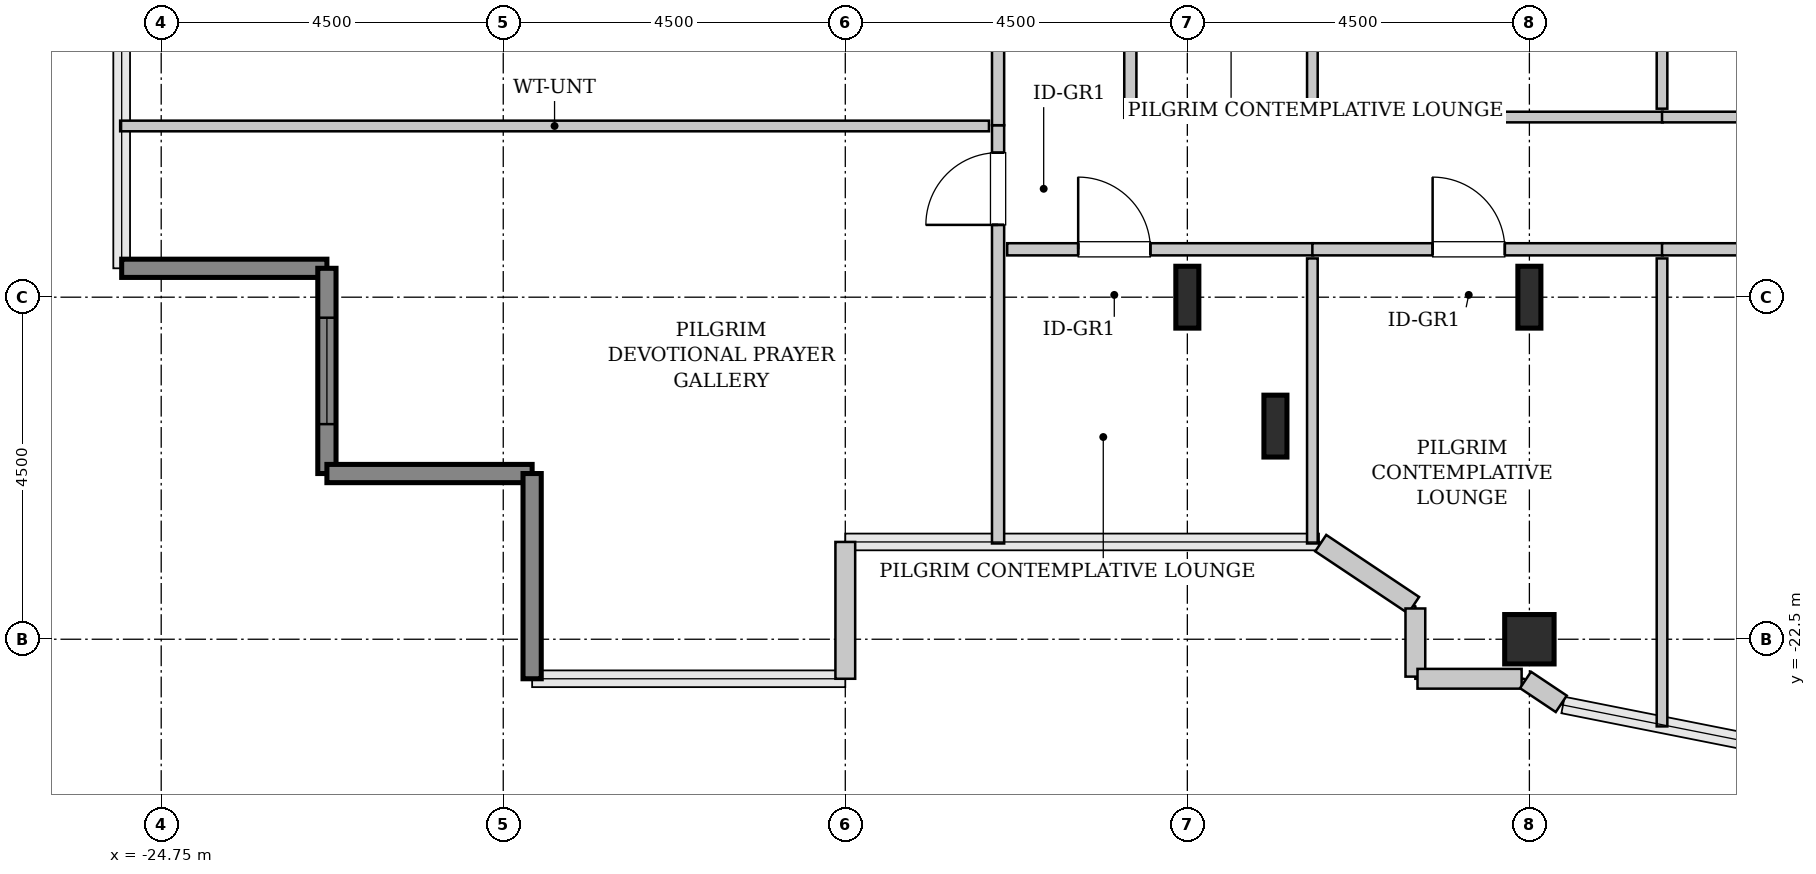
"""IFC4 building model, lengths in metres.
Left out: names, types, materials, properties, quantities, classifications, styles, units other than length and angle.
Written with IfcOpenShell. Run it as: python <this file> out.ifc"""

import sys

from ifc_helpers import new_model, si_unit, direction, frame, frame_2d, origin, origin_2d, place, context, subcontext, project, spatial, rectangle, hollow_rectangle, i_section, extrude, source, transform, mapped, element, fill, save


model = new_model("IFC4")
c1 = context("Model", 3, precision=1e-05, world=origin(), true_north=direction((0.0, 1.0)))
c2 = subcontext(c1, "Body", "Model", "MODEL_VIEW")
j1 = project(units=[si_unit("LENGTHUNIT", "METRE"), si_unit("PLANEANGLEUNIT", "RADIAN")], contexts=[c1])
p1 = place(None, origin())
s1 = spatial("IfcSite", under=j1, at=p1, CompositionType="ELEMENT")
p2 = place(p1, origin())
s2 = spatial("IfcBuilding", under=s1, at=p2, CompositionType="ELEMENT")
p3 = place(p2, frame((0.0, 0.0, 229.4)))
s3 = spatial("IfcBuildingStorey", under=s2, at=p3, CompositionType="ELEMENT", Elevation=229.4)
m1 = source(origin(), c2, "Body", "SweptSolid", [
    extrude(i_section(OverallWidth=0.303, OverallDepth=0.814, WebThickness=0.021, FlangeThickness=0.04, FilletRadius=0.03, at=origin_2d()), origin(), (0.0, 0.0, 1.0), 3.8),
])
for number, where, z_axis, x_axis in (
    (1, (-11.25, -18.0, 0.0), (0.0, 0.0, 1.0), (1.0, 0.0, 0.0)),
    (2, (-10.091, -19.696, 0.0), (0.0, 0.0, 1.0), (1.0, 0.0, 0.0)),
):
    element("IfcColumn", number, at=place(p3, frame(where, z_axis=z_axis, x_axis=x_axis)), inside=s3, PredefinedType="COLUMN", context=c2, shape_type="MappedRepresentation", body=[
        mapped(m1, transform((0.0, 0.0, 0.0), x_axis=(1.0, 0.0, 0.0), y_axis=(0.0, 1.0, 0.0), z_axis=(0.0, 0.0, 1.0), scale=1.0)),
    ])
m2 = source(origin(), c2, "Body", "SweptSolid", [
    extrude(hollow_rectangle(XDim=0.65, YDim=0.65, WallThickness=0.032, InnerFilletRadius=0.032, OuterFilletRadius=0.064, at=origin_2d()), origin(), (0.0, 0.0, 1.0), 3.8),
])
p4 = place(p3, frame((-6.75, -22.5, 0.0), z_axis=(0.0, 0.0, 1.0), x_axis=(1.0, 0.0, 0.0)))
e3 = element("IfcColumn", 3, at=p4, inside=s3, PredefinedType="COLUMN", context=c2, shape_type="MappedRepresentation", body=[
    mapped(m2, transform((0.0, 0.0, 0.0), x_axis=(1.0, 0.0, 0.0), y_axis=(0.0, 1.0, 0.0), z_axis=(0.0, 0.0, 1.0), scale=1.0)),
])
p5 = place(p3, frame((-6.75, -18.0, 0.0), z_axis=(0.0, 0.0, 1.0), x_axis=(1.0, 0.0, 0.0)))
e4 = element("IfcColumn", 4, at=p5, inside=s3, PredefinedType="COLUMN", context=c2, shape_type="MappedRepresentation", body=[
    mapped(m1, transform((0.0, 0.0, 0.0), x_axis=(1.0, 0.0, 0.0), y_axis=(0.0, 1.0, 0.0), z_axis=(0.0, 0.0, 1.0), scale=1.0)),
])
m3 = source(origin(), c2, "Body", "SweptSolid", [
    extrude(rectangle(XDim=2.7, YDim=0.24, at=frame_2d((1.35, 0.0))), origin(), (0.0, 0.0, 1.0), 3.55),
])
p6 = place(p3, frame((-25.27, -17.62, 0.0), z_axis=(0.0, 0.0, 1.0), x_axis=(1.0, 0.0, 0.0)))
e5 = element("IfcWall", 5, at=p6, inside=s3, PredefinedType="SHEAR", context=c2, shape_type="MappedRepresentation", body=[
    mapped(m3, transform((0.0, 0.0, 0.0), x_axis=(1.0, 0.0, 0.0), y_axis=(0.0, 1.0, 0.0), z_axis=(0.0, 0.0, 1.0), scale=1.0)),
])
p7 = place(p3, frame((-22.57, -17.62, 0.0), z_axis=(0.0, 0.0, 1.0), x_axis=(0.0, -1.0, 0.0)))
e6 = element("IfcWall", 6, at=p7, inside=s3, PredefinedType="SHEAR", context=c2, shape_type="MappedRepresentation", body=[
    mapped(m3, transform((0.0, 0.0, 0.0), x_axis=(1.0, 0.0, 0.0), y_axis=(0.0, 1.0, 0.0), z_axis=(0.0, 0.0, 1.0), scale=1.0)),
])
p8 = place(p7, frame((0.65, 0.0, 0.85)))
e7 = element("IfcOpeningElement", 7, at=p8, cuts=e6, PredefinedType="OPENING", context=c2, shape_type="SweptSolid", body=[
    extrude(rectangle(XDim=1.4, YDim=1.8, at=frame_2d((0.7, 0.9))), frame((0.0, 0.13, 0.0), z_axis=(0.0, -1.0, 0.0), x_axis=(1.0, 0.0, 0.0)), (0.0, 0.0, 1.0), 0.26),
])
for number, where, z_axis, x_axis in (
    (8, (-22.57, -20.32, 0.0), (0.0, 0.0, 1.0), (1.0, 0.0, 0.0)),
    (9, (-19.87, -20.32, 0.0), (0.0, 0.0, 1.0), (0.0, -1.0, 0.0)),
):
    element("IfcWall", number, at=place(p3, frame(where, z_axis=z_axis, x_axis=x_axis)), inside=s3, PredefinedType="SHEAR", context=c2, shape_type="MappedRepresentation", body=[
        mapped(m3, transform((0.0, 0.0, 0.0), x_axis=(1.0, 0.0, 0.0), y_axis=(0.0, 1.0, 0.0), z_axis=(0.0, 0.0, 1.0), scale=1.0)),
    ])
m4 = source(origin(), c2, "Body", "SweptSolid", [
    extrude(rectangle(XDim=1.8, YDim=0.26, at=frame_2d((0.9, 0.0))), origin(), (0.0, 0.0, 1.0), 3.55),
])
p9 = place(p3, frame((-15.75, -23.02, 0.0), z_axis=(0.0, 0.0, 1.0), x_axis=(0.0, 1.0, 0.0)))
e10 = element("IfcWall", 10, at=p9, inside=s3, PredefinedType="SOLIDWALL", context=c2, shape_type="MappedRepresentation", body=[
    mapped(m4, transform((0.0, 0.0, 0.0), x_axis=(1.0, 0.0, 0.0), y_axis=(0.0, 1.0, 0.0), z_axis=(0.0, 0.0, 1.0), scale=1.0)),
])
m5 = source(origin(), c2, "Body", "SweptSolid", [
    extrude(rectangle(XDim=1.469, YDim=0.26, at=frame_2d((0.734, 0.0))), origin(), (0.0, 0.0, 1.0), 3.55),
])
p10 = place(p3, frame((-9.495, -21.236, 0.0), z_axis=(0.0, 0.0, 1.0), x_axis=(0.831461760506, -0.555581983884, 0.0)))
e11 = element("IfcWall", 11, at=p10, inside=s3, PredefinedType="SOLIDWALL", context=c2, shape_type="MappedRepresentation", body=[
    mapped(m5, transform((0.0, 0.0, 0.0), x_axis=(1.0, 0.0, 0.0), y_axis=(0.0, 1.0, 0.0), z_axis=(0.0, 0.0, 1.0), scale=1.0)),
])
m6 = source(origin(), c2, "Body", "SweptSolid", [
    extrude(rectangle(XDim=0.897, YDim=0.26, at=frame_2d((0.448, 0.0))), origin(), (0.0, 0.0, 1.0), 3.55),
])
p11 = place(p3, frame((-8.25, -22.095, 0.0), z_axis=(0.0, 0.0, 1.0), x_axis=(0.0, -1.0, 0.0)))
e12 = element("IfcWall", 12, at=p11, inside=s3, PredefinedType="SOLIDWALL", context=c2, shape_type="MappedRepresentation", body=[
    mapped(m6, transform((0.0, 0.0, 0.0), x_axis=(1.0, 0.0, 0.0), y_axis=(0.0, 1.0, 0.0), z_axis=(0.0, 0.0, 1.0), scale=1.0)),
])
m7 = source(origin(), c2, "Body", "SweptSolid", [
    extrude(rectangle(XDim=1.37, YDim=0.26, at=frame_2d((0.685, 0.0))), origin(), (0.0, 0.0, 1.0), 3.55),
])
p12 = place(p3, frame((-8.222, -23.02, 0.0), z_axis=(0.0, 0.0, 1.0), x_axis=(1.0, 0.0, 0.0)))
e13 = element("IfcWall", 13, at=p12, inside=s3, PredefinedType="SOLIDWALL", context=c2, shape_type="MappedRepresentation", body=[
    mapped(m7, transform((0.0, 0.0, 0.0), x_axis=(1.0, 0.0, 0.0), y_axis=(0.0, 1.0, 0.0), z_axis=(0.0, 0.0, 1.0), scale=1.0)),
])
m8 = source(origin(), c2, "Body", "SweptSolid", [
    extrude(rectangle(XDim=0.565, YDim=0.26, at=frame_2d((0.283, 0.0))), origin(), (0.0, 0.0, 1.0), 3.55),
])
p13 = place(p3, frame((-6.801, -23.036, 0.0), z_axis=(0.0, 0.0, 1.0), x_axis=(0.831651492666, -0.555297933317, 0.0)))
e14 = element("IfcWall", 14, at=p13, inside=s3, PredefinedType="SOLIDWALL", context=c2, shape_type="MappedRepresentation", body=[
    mapped(m8, transform((0.0, 0.0, 0.0), x_axis=(1.0, 0.0, 0.0), y_axis=(0.0, 1.0, 0.0), z_axis=(0.0, 0.0, 1.0), scale=1.0)),
])
m9 = source(origin(), c2, "Body", "SweptSolid", [
    extrude(rectangle(XDim=5.502, YDim=0.16, at=frame_2d((2.751, 0.0))), origin(), (0.0, 0.0, 1.0), 3.535),
])
p14 = place(p3, frame((-13.74, -21.24, 0.0), z_axis=(0.0, 0.0, 1.0), x_axis=(0.0, 1.0, 0.0)))
e15 = element("IfcWall", 15, at=p14, inside=s3, PredefinedType="PARTITIONING", context=c2, shape_type="MappedRepresentation", body=[
    mapped(m9, transform((0.0, 0.0, 0.0), x_axis=(1.0, 0.0, 0.0), y_axis=(0.0, 1.0, 0.0), z_axis=(0.0, 0.0, 1.0), scale=1.0)),
])
p15 = place(p14, frame((4.191, 0.0, 0.0)))
e16 = element("IfcOpeningElement", 16, at=p15, cuts=e15, PredefinedType="OPENING", context=c2, shape_type="SweptSolid", body=[
    extrude(rectangle(XDim=0.95, YDim=2.1, at=frame_2d((0.475, 1.05))), frame((0.0, 0.09, 0.0), z_axis=(0.0, -1.0, 0.0), x_axis=(1.0, 0.0, 0.0)), (0.0, 0.0, 1.0), 0.18),
])
m10 = source(origin(), c2, "Body", "SweptSolid", [
    extrude(rectangle(XDim=11.43, YDim=0.14, at=frame_2d((5.715, 0.0))), origin(), (0.0, 0.0, 1.0), 3.535),
])
p16 = place(p3, frame((-25.29, -15.748, 0.0), z_axis=(0.0, 0.0, 1.0), x_axis=(1.0, 0.0, 0.0)))
e17 = element("IfcWall", 17, at=p16, inside=s3, PredefinedType="PARTITIONING", context=c2, shape_type="MappedRepresentation", body=[
    mapped(m10, transform((0.0, 0.0, 0.0), x_axis=(1.0, 0.0, 0.0), y_axis=(0.0, 1.0, 0.0), z_axis=(0.0, 0.0, 1.0), scale=1.0)),
])
m11 = source(origin(), c2, "Body", "SweptSolid", [
    extrude(rectangle(XDim=7.242, YDim=0.16, at=frame_2d((3.621, 0.0))), origin(), (0.0, 0.0, 1.0), 3.535),
])
p17 = place(p3, frame((-13.74, -15.738, 0.0), z_axis=(0.0, 0.0, 1.0), x_axis=(0.0, 1.0, 0.0)))
e18 = element("IfcWall", 18, at=p17, inside=s3, PredefinedType="PARTITIONING", context=c2, shape_type="MappedRepresentation", body=[
    mapped(m11, transform((0.0, 0.0, 0.0), x_axis=(1.0, 0.0, 0.0), y_axis=(0.0, 1.0, 0.0), z_axis=(0.0, 0.0, 1.0), scale=1.0)),
])
p18 = place(p17, frame((3.146, 0.0, 0.0)))
e19 = element("IfcOpeningElement", 19, at=p18, cuts=e18, PredefinedType="OPENING", context=c2, shape_type="SweptSolid", body=[
    extrude(rectangle(XDim=0.95, YDim=2.1, at=frame_2d((0.475, 1.05))), frame((0.0, 0.09, 0.0), z_axis=(0.0, -1.0, 0.0), x_axis=(1.0, 0.0, 0.0)), (0.0, 0.0, 1.0), 0.18),
])
m12 = source(origin(), c2, "Body", "SweptSolid", [
    extrude(rectangle(XDim=4.025, YDim=0.16, at=frame_2d((2.013, 0.0))), origin(), (0.0, 0.0, 1.0), 3.535),
])
p19 = place(p3, frame((-13.62, -17.37, 0.0), z_axis=(0.0, 0.0, 1.0), x_axis=(1.0, 0.0, 0.0)))
e20 = element("IfcWall", 20, at=p19, inside=s3, PredefinedType="PARTITIONING", context=c2, shape_type="MappedRepresentation", body=[
    mapped(m12, transform((0.0, 0.0, 0.0), x_axis=(1.0, 0.0, 0.0), y_axis=(0.0, 1.0, 0.0), z_axis=(0.0, 0.0, 1.0), scale=1.0)),
])
p20 = place(p19, frame((0.934, 0.0, 0.0)))
e21 = element("IfcOpeningElement", 21, at=p20, cuts=e20, PredefinedType="OPENING", context=c2, shape_type="SweptSolid", body=[
    extrude(rectangle(XDim=0.95, YDim=2.1, at=frame_2d((0.475, 1.05))), frame((0.0, 0.09, 0.0), z_axis=(0.0, -1.0, 0.0), x_axis=(1.0, 0.0, 0.0)), (0.0, 0.0, 1.0), 0.18),
])
m13 = source(origin(), c2, "Body", "SweptSolid", [
    extrude(rectangle(XDim=3.75, YDim=0.14, at=frame_2d((1.875, 0.0))), origin(), (0.0, 0.0, 1.0), 3.535),
])
p21 = place(p3, frame((-9.605, -21.24, 0.0), z_axis=(0.0, 0.0, 1.0), x_axis=(0.0, 1.0, 0.0)))
e22 = element("IfcWall", 22, at=p21, inside=s3, PredefinedType="PARTITIONING", context=c2, shape_type="MappedRepresentation", body=[
    mapped(m13, transform((0.0, 0.0, 0.0), x_axis=(1.0, 0.0, 0.0), y_axis=(0.0, 1.0, 0.0), z_axis=(0.0, 0.0, 1.0), scale=1.0)),
])
m14 = source(origin(), c2, "Body", "SweptSolid", [
    extrude(rectangle(XDim=4.18, YDim=0.16, at=frame_2d((2.09, 0.0))), origin(), (0.0, 0.0, 1.0), 3.535),
])
p22 = place(p3, frame((-12.0, -15.64, 0.0), z_axis=(0.0, 0.0, 1.0), x_axis=(0.0, 1.0, 0.0)))
e23 = element("IfcWall", 23, at=p22, inside=s3, PredefinedType="PARTITIONING", context=c2, shape_type="MappedRepresentation", body=[
    mapped(m14, transform((0.0, 0.0, 0.0), x_axis=(1.0, 0.0, 0.0), y_axis=(0.0, 1.0, 0.0), z_axis=(0.0, 0.0, 1.0), scale=1.0)),
])
p23 = place(p22, frame((1.615, 0.0, 0.0)))
e24 = element("IfcOpeningElement", 24, at=p23, cuts=e23, PredefinedType="OPENING", context=c2, shape_type="SweptSolid", body=[
    extrude(rectangle(XDim=0.95, YDim=2.1, at=frame_2d((0.475, 1.05))), frame((0.0, 0.09, 0.0), z_axis=(0.0, -1.0, 0.0), x_axis=(1.0, 0.0, 0.0)), (0.0, 0.0, 1.0), 0.18),
])
m15 = source(origin(), c2, "Body", "SweptSolid", [
    extrude(rectangle(XDim=4.18, YDim=0.14, at=frame_2d((2.09, 0.0))), origin(), (0.0, 0.0, 1.0), 3.535),
])
p24 = place(p3, frame((-9.605, -15.64, 0.0), z_axis=(0.0, 0.0, 1.0), x_axis=(0.0, 1.0, 0.0)))
e25 = element("IfcWall", 25, at=p24, inside=s3, PredefinedType="PARTITIONING", context=c2, shape_type="MappedRepresentation", body=[
    mapped(m15, transform((0.0, 0.0, 0.0), x_axis=(1.0, 0.0, 0.0), y_axis=(0.0, 1.0, 0.0), z_axis=(0.0, 0.0, 1.0), scale=1.0)),
])
m16 = source(origin(), c2, "Body", "SweptSolid", [
    extrude(rectangle(XDim=2.165, YDim=0.14, at=frame_2d((1.083, 0.0))), origin(), (0.0, 0.0, 1.0), 3.535),
])
p25 = place(p3, frame((-11.88, -15.63, 0.0), z_axis=(0.0, 0.0, 1.0), x_axis=(1.0, 0.0, 0.0)))
e26 = element("IfcWall", 26, at=p25, inside=s3, PredefinedType="PARTITIONING", context=c2, shape_type="MappedRepresentation", body=[
    mapped(m16, transform((0.0, 0.0, 0.0), x_axis=(1.0, 0.0, 0.0), y_axis=(0.0, 1.0, 0.0), z_axis=(0.0, 0.0, 1.0), scale=1.0)),
])
m17 = source(origin(), c2, "Body", "SweptSolid", [
    extrude(rectangle(XDim=4.61, YDim=0.16, at=frame_2d((2.305, 0.0))), origin(), (0.0, 0.0, 1.0), 3.535),
])
p26 = place(p3, frame((-9.605, -17.37, 0.0), z_axis=(0.0, 0.0, 1.0), x_axis=(1.0, 0.0, 0.0)))
e27 = element("IfcWall", 27, at=p26, inside=s3, PredefinedType="PARTITIONING", context=c2, shape_type="MappedRepresentation", body=[
    mapped(m17, transform((0.0, 0.0, 0.0), x_axis=(1.0, 0.0, 0.0), y_axis=(0.0, 1.0, 0.0), z_axis=(0.0, 0.0, 1.0), scale=1.0)),
])
p27 = place(p26, frame((1.582, 0.0, 0.0)))
e28 = element("IfcOpeningElement", 28, at=p27, cuts=e27, PredefinedType="OPENING", context=c2, shape_type="SweptSolid", body=[
    extrude(rectangle(XDim=0.95, YDim=2.1, at=frame_2d((0.475, 1.05))), frame((0.0, 0.09, 0.0), z_axis=(0.0, -1.0, 0.0), x_axis=(1.0, 0.0, 0.0)), (0.0, 0.0, 1.0), 0.18),
])
m18 = source(origin(), c2, "Body", "SweptSolid", [
    extrude(rectangle(XDim=6.157, YDim=0.14, at=frame_2d((3.078, 0.0))), origin(), (0.0, 0.0, 1.0), 3.535),
])
p28 = place(p3, frame((-5.005, -23.647, 0.0), z_axis=(0.0, 0.0, 1.0), x_axis=(0.0, 1.0, 0.0)))
e29 = element("IfcWall", 29, at=p28, inside=s3, PredefinedType="PARTITIONING", context=c2, shape_type="MappedRepresentation", body=[
    mapped(m18, transform((0.0, 0.0, 0.0), x_axis=(1.0, 0.0, 0.0), y_axis=(0.0, 1.0, 0.0), z_axis=(0.0, 0.0, 1.0), scale=1.0)),
])
m19 = source(origin(), c2, "Body", "SweptSolid", [
    extrude(rectangle(XDim=4.5, YDim=0.14, at=frame_2d((2.25, 0.0))), origin(), (0.0, 0.0, 1.0), 3.535),
])
p29 = place(p3, frame((-9.495, -15.63, 0.0), z_axis=(0.0, 0.0, 1.0), x_axis=(1.0, 0.0, 0.0)))
e30 = element("IfcWall", 30, at=p29, inside=s3, PredefinedType="PARTITIONING", context=c2, shape_type="MappedRepresentation", body=[
    mapped(m19, transform((0.0, 0.0, 0.0), x_axis=(1.0, 0.0, 0.0), y_axis=(0.0, 1.0, 0.0), z_axis=(0.0, 0.0, 1.0), scale=1.0)),
])
m20 = source(origin(), c2, "Body", "SweptSolid", [
    extrude(rectangle(XDim=3.93, YDim=0.14, at=frame_2d((1.965, 0.0))), origin(), (0.0, 0.0, 1.0), 3.535),
])
p30 = place(p3, frame((-5.005, -15.52, 0.0), z_axis=(0.0, 0.0, 1.0), x_axis=(0.0, 1.0, 0.0)))
e31 = element("IfcWall", 31, at=p30, inside=s3, PredefinedType="PARTITIONING", context=c2, shape_type="MappedRepresentation", body=[
    mapped(m20, transform((0.0, 0.0, 0.0), x_axis=(1.0, 0.0, 0.0), y_axis=(0.0, 1.0, 0.0), z_axis=(0.0, 0.0, 1.0), scale=1.0)),
])
m21 = source(origin(), c2, "Body", "SweptSolid", [
    extrude(rectangle(XDim=7.21, YDim=0.16, at=frame_2d((3.605, 0.0))), origin(), (0.0, 0.0, 1.0), 3.535),
])
p31 = place(p3, frame((-5.005, -17.37, 0.0), z_axis=(0.0, 0.0, 1.0), x_axis=(1.0, 0.0, 0.0)))
e32 = element("IfcWall", 32, at=p31, inside=s3, PredefinedType="PARTITIONING", context=c2, shape_type="MappedRepresentation", body=[
    mapped(m21, transform((0.0, 0.0, 0.0), x_axis=(1.0, 0.0, 0.0), y_axis=(0.0, 1.0, 0.0), z_axis=(0.0, 0.0, 1.0), scale=1.0)),
])
p32 = place(p31, frame((3.13, 0.0, 0.0)))
e33 = element("IfcOpeningElement", 33, at=p32, cuts=e32, PredefinedType="OPENING", context=c2, shape_type="SweptSolid", body=[
    extrude(rectangle(XDim=0.95, YDim=2.1, at=frame_2d((0.475, 1.05))), frame((0.0, 0.09, 0.0), z_axis=(0.0, -1.0, 0.0), x_axis=(1.0, 0.0, 0.0)), (0.0, 0.0, 1.0), 0.18),
])
m22 = source(origin(), c2, "Body", "SweptSolid", [
    extrude(rectangle(XDim=7.21, YDim=0.14, at=frame_2d((3.605, 0.0))), origin(), (0.0, 0.0, 1.0), 3.535),
])
p33 = place(p3, frame((-5.005, -15.63, 0.0), z_axis=(0.0, 0.0, 1.0), x_axis=(1.0, 0.0, 0.0)))
e34 = element("IfcWall", 34, at=p33, inside=s3, PredefinedType="PARTITIONING", context=c2, shape_type="MappedRepresentation", body=[
    mapped(m22, transform((0.0, 0.0, 0.0), x_axis=(1.0, 0.0, 0.0), y_axis=(0.0, 1.0, 0.0), z_axis=(0.0, 0.0, 1.0), scale=1.0)),
])
m23 = source(origin(), c2, "Body", "SweptSolid", [
    extrude(rectangle(XDim=1.4, YDim=1.8, at=frame_2d((0.7, 0.9))), frame((0.0, 0.03, 0.0), z_axis=(0.0, -1.0, 0.0), x_axis=(1.0, 0.0, 0.0)), (0.0, 0.0, 1.0), 0.06),
])
p34 = place(p8, origin())
e35 = element("IfcWindow", 35, at=p34, inside=s3, PartitioningType="SINGLE_PANEL", PredefinedType="WINDOW", context=c2, shape_type="MappedRepresentation", body=[
    mapped(m23, transform((0.0, 0.0, 0.0), x_axis=(1.0, 0.0, 0.0), y_axis=(0.0, 1.0, 0.0), z_axis=(0.0, 0.0, 1.0), scale=1.0)),
])
fill(e7, e35)
m24 = source(origin(), c2, "Body", "SweptSolid", [
    extrude(rectangle(XDim=0.95, YDim=2.1, at=frame_2d((0.475, 1.05))), frame((0.0, 0.025, 0.0), z_axis=(0.0, -1.0, 0.0), x_axis=(1.0, 0.0, 0.0)), (0.0, 0.0, 1.0), 0.05),
])
p35 = place(p15, origin())
e36 = element("IfcDoor", 36, at=p35, inside=s3, OperationType="SINGLE_SWING_LEFT", PredefinedType="DOOR", context=c2, shape_type="MappedRepresentation", body=[
    mapped(m24, transform((0.0, 0.0, 0.0), x_axis=(1.0, 0.0, 0.0), y_axis=(0.0, 1.0, 0.0), z_axis=(0.0, 0.0, 1.0), scale=1.0)),
])
fill(e16, e36)
p36 = place(p20, origin())
e37 = element("IfcDoor", 37, at=p36, inside=s3, OperationType="SINGLE_SWING_LEFT", PredefinedType="DOOR", context=c2, shape_type="MappedRepresentation", body=[
    mapped(m24, transform((0.0, 0.0, 0.0), x_axis=(1.0, 0.0, 0.0), y_axis=(0.0, 1.0, 0.0), z_axis=(0.0, 0.0, 1.0), scale=1.0)),
])
fill(e21, e37)
p37 = place(p27, origin())
e38 = element("IfcDoor", 38, at=p37, inside=s3, OperationType="SINGLE_SWING_LEFT", PredefinedType="DOOR", context=c2, shape_type="MappedRepresentation", body=[
    mapped(m24, transform((0.0, 0.0, 0.0), x_axis=(1.0, 0.0, 0.0), y_axis=(0.0, 1.0, 0.0), z_axis=(0.0, 0.0, 1.0), scale=1.0)),
])
fill(e28, e38)
save(model, sys.argv[1])
